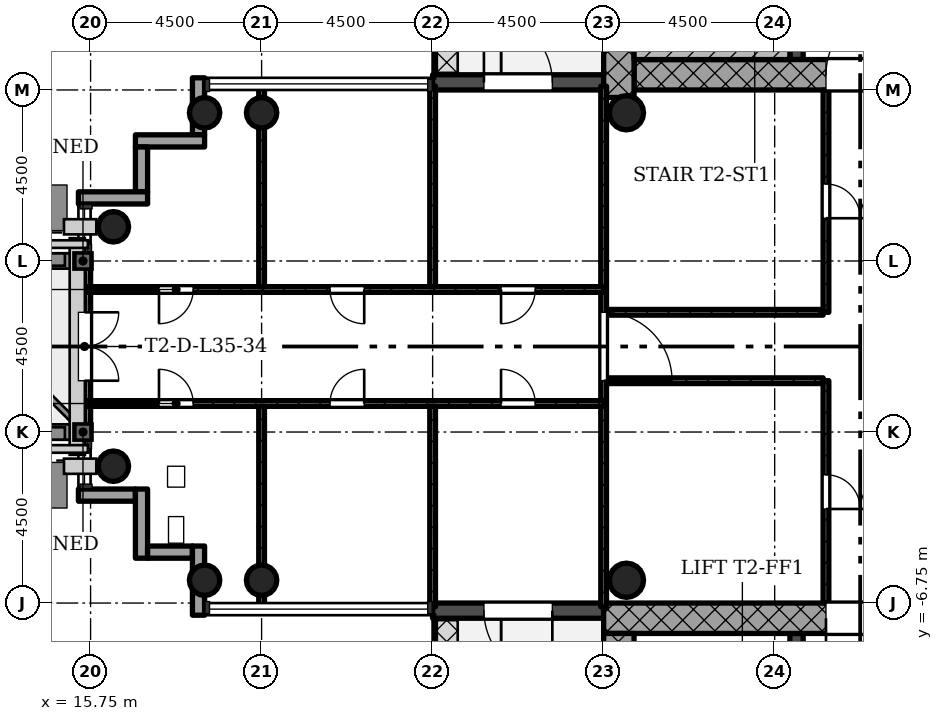
"""IFC4 building model, lengths in metres.
Left out: names, types, materials, properties, quantities, classifications, styles, units other than length and angle.
Written with IfcOpenShell. Run it as: python <this file> out.ifc"""

import sys

from ifc_helpers import new_model, si_unit, direction, frame, frame_2d, origin, origin_2d, place, context, subcontext, project, spatial, rectangle, hollow_circle, extrude, element, fill, save


model = new_model("IFC4")
c1 = context("Model", 3, precision=1e-05, world=origin(), true_north=direction((0.0, 1.0)))
c2 = subcontext(c1, "Body", "Model", "MODEL_VIEW")
j1 = project(units=[si_unit("LENGTHUNIT", "METRE"), si_unit("PLANEANGLEUNIT", "RADIAN")], contexts=[c1])
p1 = place(None, origin())
s1 = spatial("IfcSite", under=j1, at=p1, CompositionType="ELEMENT")
p2 = place(p1, origin())
s2 = spatial("IfcBuilding", under=s1, at=p2, CompositionType="ELEMENT")
p3 = place(p2, frame((0.0, 0.0, 128.7)))
s3 = spatial("IfcBuildingStorey", under=s2, at=p3, CompositionType="ELEMENT", Elevation=128.7)
p4 = place(p3, frame((30.05, 7.15, 0.0), z_axis=(0.0, 0.0, 1.0), x_axis=(1.0, 0.0, 0.0)))
e1 = element("IfcWall", 1, at=p4, inside=s3, PredefinedType="SHEAR", context=c2, shape_type="SweptSolid", body=[
    extrude(rectangle(XDim=12.7, YDim=0.8, at=frame_2d((6.35, 0.0))), origin(), (0.0, 0.0, 1.0), 5.0),
])
p5 = place(p4, frame((5.05, 0.0, 0.0)))
e2 = element("IfcOpeningElement", 2, at=p5, cuts=e1, PredefinedType="OPENING", context=c2, shape_type="SweptSolid", body=[
    extrude(rectangle(XDim=1.8, YDim=2.1, at=frame_2d((0.9, 1.05))), frame((0.0, 0.41, 0.0), z_axis=(0.0, -1.0, 0.0), x_axis=(1.0, 0.0, 0.0)), (0.0, 0.0, 1.0), 0.82),
])
p6 = place(p3, frame((29.65, 15.348, 0.0), z_axis=(0.0, 0.0, 1.0), x_axis=(0.0, -1.0, 0.0)))
e3 = element("IfcWall", 3, at=p6, inside=s3, PredefinedType="SHEAR", context=c2, shape_type="SweptSolid", body=[
    extrude(rectangle(XDim=8.796, YDim=0.8, at=frame_2d((4.398, 0.0))), origin(), (0.0, 0.0, 1.0), 5.0),
])
p7 = place(p3, frame((34.325, 7.55, 0.0), z_axis=(0.0, 0.0, 1.0), x_axis=(0.0, 1.0, 0.0)))
e4 = element("IfcWall", 4, at=p7, inside=s3, PredefinedType="SHEAR", context=c2, shape_type="SweptSolid", body=[
    extrude(rectangle(XDim=7.4, YDim=0.35, at=frame_2d((3.7, 0.0))), origin(), (0.0, 0.0, 1.0), 5.0),
])
p8 = place(p7, frame((0.85, 0.0, 0.0)))
e5 = element("IfcOpeningElement", 5, at=p8, cuts=e4, PredefinedType="OPENING", context=c2, shape_type="SweptSolid", body=[
    extrude(rectangle(XDim=0.9, YDim=2.1, at=frame_2d((0.45, 1.05))), frame((0.0, 0.185, 0.0), z_axis=(0.0, -1.0, 0.0), x_axis=(1.0, 0.0, 0.0)), (0.0, 0.0, 1.0), 0.37),
])
p9 = place(p3, frame((41.95, -7.15, 0.0), z_axis=(0.0, 0.0, 1.0), x_axis=(-1.0, 0.0, 0.0)))
e6 = element("IfcWall", 6, at=p9, inside=s3, PredefinedType="SHEAR", context=c2, shape_type="SweptSolid", body=[
    extrude(rectangle(XDim=12.7, YDim=0.8, at=frame_2d((6.35, 0.0))), origin(), (0.0, 0.0, 1.0), 5.0),
])
p10 = place(p9, frame((5.05, 0.0, 0.0)))
e7 = element("IfcOpeningElement", 7, at=p10, cuts=e6, PredefinedType="OPENING", context=c2, shape_type="SweptSolid", body=[
    extrude(rectangle(XDim=1.8, YDim=2.1, at=frame_2d((0.9, 1.05))), frame((0.0, 0.41, 0.0), z_axis=(0.0, -1.0, 0.0), x_axis=(1.0, 0.0, 0.0)), (0.0, 0.0, 1.0), 0.82),
])
p11 = place(p3, frame((29.65, -7.55, 0.0), z_axis=(0.0, 0.0, 1.0), x_axis=(0.0, -1.0, 0.0)))
e8 = element("IfcWall", 8, at=p11, inside=s3, PredefinedType="SHEAR", context=c2, shape_type="SweptSolid", body=[
    extrude(rectangle(XDim=8.2, YDim=0.8, at=frame_2d((4.1, 0.0))), origin(), (0.0, 0.0, 1.0), 5.0),
])
p12 = place(p3, frame((34.325, -14.95, 0.0), z_axis=(0.0, 0.0, 1.0), x_axis=(0.0, 1.0, 0.0)))
e9 = element("IfcWall", 9, at=p12, inside=s3, PredefinedType="SHEAR", context=c2, shape_type="SweptSolid", body=[
    extrude(rectangle(XDim=7.4, YDim=0.35, at=frame_2d((3.7, 0.0))), origin(), (0.0, 0.0, 1.0), 5.0),
])
p13 = place(p12, frame((5.35, 0.0, 0.0)))
e10 = element("IfcOpeningElement", 10, at=p13, cuts=e9, PredefinedType="OPENING", context=c2, shape_type="SweptSolid", body=[
    extrude(rectangle(XDim=1.1, YDim=2.1, at=frame_2d((0.55, 1.05))), frame((0.0, 0.185, 0.0), z_axis=(0.0, -1.0, 0.0), x_axis=(1.0, 0.0, 0.0)), (0.0, 0.0, 1.0), 0.37),
])
p14 = place(p12, frame((3.2, 0.0, 0.0)))
e11 = element("IfcOpeningElement", 11, at=p14, cuts=e9, PredefinedType="OPENING", context=c2, shape_type="SweptSolid", body=[
    extrude(rectangle(XDim=1.1, YDim=2.1, at=frame_2d((0.55, 1.05))), frame((0.0, 0.185, 0.0), z_axis=(0.0, -1.0, 0.0), x_axis=(1.0, 0.0, 0.0)), (0.0, 0.0, 1.0), 0.37),
])
p15 = place(p12, frame((1.0, 0.0, 0.0)))
e12 = element("IfcOpeningElement", 12, at=p15, cuts=e9, PredefinedType="OPENING", context=c2, shape_type="SweptSolid", body=[
    extrude(rectangle(XDim=1.1, YDim=2.1, at=frame_2d((0.55, 1.05))), frame((0.0, 0.185, 0.0), z_axis=(0.0, -1.0, 0.0), x_axis=(1.0, 0.0, 0.0)), (0.0, 0.0, 1.0), 0.37),
])
for number, where, z_axis, x_axis in (
    (13, (20.25, 6.15, 0.0), (0.0, 0.0, 1.0), (1.0, 0.0, 0.0)),
    (14, (20.25, -6.15, 0.0), (0.0, 0.0, 1.0), (1.0, 0.0, 0.0)),
    (15, (18.75, 6.15, 0.0), (0.0, 0.0, 1.0), (1.0, 0.0, 0.0)),
    (16, (18.75, -6.15, 0.0), (0.0, 0.0, 1.0), (1.0, 0.0, 0.0)),
    (17, (16.35, 3.15, 0.0), (0.0, 0.0, 1.0), (1.0, 0.0, 0.0)),
    (18, (16.35, -3.15, 0.0), (0.0, 0.0, 1.0), (1.0, 0.0, 0.0)),
):
    element("IfcColumn", number, at=place(p3, frame(where, z_axis=z_axis, x_axis=x_axis)), inside=s3, PredefinedType="COLUMN", context=c2, shape_type="SweptSolid", body=[
        extrude(hollow_circle(Radius=0.4, WallThickness=0.028, at=origin_2d()), origin(), (0.0, 0.0, 1.0), 5.0),
    ])
for number, where, z_axis, x_axis in (
    (19, (29.85, 6.15, 0.0), (0.0, 0.0, 1.0), (1.0, 0.0, 0.0)),
    (20, (29.85, -6.15, 0.0), (0.0, 0.0, 1.0), (1.0, 0.0, 0.0)),
):
    element("IfcColumn", number, at=place(p3, frame(where, z_axis=z_axis, x_axis=x_axis)), inside=s3, PredefinedType="COLUMN", context=c2, shape_type="SweptSolid", body=[
        extrude(hollow_circle(Radius=0.45, WallThickness=0.032, at=origin_2d()), origin(), (0.0, 0.0, 1.0), 5.0),
    ])
p16 = place(p3, frame((29.25, 6.95, -0.02), z_axis=(0.0, 0.0, 1.0), x_axis=(-1.0, 0.0, 0.0)))
e21 = element("IfcWall", 21, at=p16, inside=s3, PredefinedType="STANDARD", context=c2, shape_type="SweptSolid", body=[
    extrude(rectangle(XDim=4.5, YDim=0.4, at=frame_2d((2.25, 0.0))), origin(), (0.0, 0.0, 1.0), 4.72),
])
p17 = place(p16, frame((1.35, 0.0, 0.02)))
e22 = element("IfcOpeningElement", 22, at=p17, cuts=e21, PredefinedType="OPENING", context=c2, shape_type="SweptSolid", body=[
    extrude(rectangle(XDim=1.8, YDim=2.1, at=frame_2d((0.9, 1.05))), frame((0.0, 0.21, 0.0), z_axis=(0.0, -1.0, 0.0), x_axis=(1.0, 0.0, 0.0)), (0.0, 0.0, 1.0), 0.42),
])
p18 = place(p3, frame((18.59, 7.07, -0.3), z_axis=(0.0, 0.0, 1.0), x_axis=(0.0, -1.0, 0.0)))
e23 = element("IfcWall", 23, at=p18, inside=s3, PredefinedType="STANDARD", context=c2, shape_type="SweptSolid", body=[
    extrude(rectangle(XDim=1.5, YDim=0.32, at=frame_2d((0.75, 0.0))), origin(), (0.0, 0.0, 1.0), 5.0),
])
p19 = place(p3, frame((18.75, 5.41, -0.3), z_axis=(0.0, 0.0, 1.0), x_axis=(-1.0, 0.0, 0.0)))
e24 = element("IfcWall", 24, at=p19, inside=s3, PredefinedType="STANDARD", context=c2, shape_type="SweptSolid", body=[
    extrude(rectangle(XDim=1.82, YDim=0.32, at=frame_2d((0.91, 0.0))), origin(), (0.0, 0.0, 1.0), 5.0),
])
p20 = place(p3, frame((17.09, 5.25, -0.3), z_axis=(0.0, 0.0, 1.0), x_axis=(0.0, -1.0, 0.0)))
e25 = element("IfcWall", 25, at=p20, inside=s3, PredefinedType="STANDARD", context=c2, shape_type="SweptSolid", body=[
    extrude(rectangle(XDim=1.18, YDim=0.32, at=frame_2d((0.59, 0.0))), origin(), (0.0, 0.0, 1.0), 5.0),
])
p21 = place(p3, frame((17.25, 3.91, -0.3), z_axis=(0.0, 0.0, 1.0), x_axis=(-1.0, 0.0, 0.0)))
e26 = element("IfcWall", 26, at=p21, inside=s3, PredefinedType="STANDARD", context=c2, shape_type="SweptSolid", body=[
    extrude(rectangle(XDim=1.82, YDim=0.32, at=frame_2d((0.91, 0.0))), origin(), (0.0, 0.0, 1.0), 5.0),
])
p22 = place(p3, frame((15.59, 2.25, -0.12), z_axis=(0.0, 0.0, 1.0), x_axis=(0.0, -1.0, 0.0)))
e27 = element("IfcWall", 27, at=p22, inside=s3, PredefinedType="STANDARD", context=c2, shape_type="SweptSolid", body=[
    extrude(rectangle(XDim=4.5, YDim=0.32, at=frame_2d((2.25, 0.0))), origin(), (0.0, 0.0, 1.0), 4.82),
])
p23 = place(p22, frame((1.35, 0.0, 0.0)))
e28 = element("IfcOpeningElement", 28, at=p23, cuts=e27, PredefinedType="OPENING", context=c2, shape_type="SweptSolid", body=[
    extrude(rectangle(XDim=1.8, YDim=2.1, at=frame_2d((0.9, 1.05))), frame((0.0, 0.17, 0.0), z_axis=(0.0, -1.0, 0.0), x_axis=(1.0, 0.0, 0.0)), (0.0, 0.0, 1.0), 0.34),
])
p24 = place(p3, frame((15.43, -3.91, -0.3), z_axis=(0.0, 0.0, 1.0), x_axis=(1.0, 0.0, 0.0)))
e29 = element("IfcWall", 29, at=p24, inside=s3, PredefinedType="STANDARD", context=c2, shape_type="SweptSolid", body=[
    extrude(rectangle(XDim=1.5, YDim=0.32, at=frame_2d((0.75, 0.0))), origin(), (0.0, 0.0, 1.0), 5.0),
])
p25 = place(p3, frame((17.09, -3.75, -0.3), z_axis=(0.0, 0.0, 1.0), x_axis=(0.0, -1.0, 0.0)))
e30 = element("IfcWall", 30, at=p25, inside=s3, PredefinedType="STANDARD", context=c2, shape_type="SweptSolid", body=[
    extrude(rectangle(XDim=1.82, YDim=0.32, at=frame_2d((0.91, 0.0))), origin(), (0.0, 0.0, 1.0), 5.0),
])
p26 = place(p3, frame((17.25, -5.41, -0.3), z_axis=(0.0, 0.0, 1.0), x_axis=(1.0, 0.0, 0.0)))
e31 = element("IfcWall", 31, at=p26, inside=s3, PredefinedType="STANDARD", context=c2, shape_type="SweptSolid", body=[
    extrude(rectangle(XDim=1.18, YDim=0.32, at=frame_2d((0.59, 0.0))), origin(), (0.0, 0.0, 1.0), 5.0),
])
p27 = place(p3, frame((18.59, -5.25, -0.3), z_axis=(0.0, 0.0, 1.0), x_axis=(0.0, -1.0, 0.0)))
e32 = element("IfcWall", 32, at=p27, inside=s3, PredefinedType="STANDARD", context=c2, shape_type="SweptSolid", body=[
    extrude(rectangle(XDim=1.82, YDim=0.32, at=frame_2d((0.91, 0.0))), origin(), (0.0, 0.0, 1.0), 5.0),
])
p28 = place(p3, frame((24.75, -6.95, -0.02), z_axis=(0.0, 0.0, 1.0), x_axis=(1.0, 0.0, 0.0)))
e33 = element("IfcWall", 33, at=p28, inside=s3, PredefinedType="STANDARD", context=c2, shape_type="SweptSolid", body=[
    extrude(rectangle(XDim=4.5, YDim=0.4, at=frame_2d((2.25, 0.0))), origin(), (0.0, 0.0, 1.0), 4.72),
])
p29 = place(p28, frame((1.35, 0.0, 0.02)))
e34 = element("IfcOpeningElement", 34, at=p29, cuts=e33, PredefinedType="OPENING", context=c2, shape_type="SweptSolid", body=[
    extrude(rectangle(XDim=1.8, YDim=2.1, at=frame_2d((0.9, 1.05))), frame((0.0, 0.21, 0.0), z_axis=(0.0, -1.0, 0.0), x_axis=(1.0, 0.0, 0.0)), (0.0, 0.0, 1.0), 0.42),
])
p30 = place(p3, frame((35.1, 0.9, 0.0), z_axis=(0.0, 0.0, 1.0), x_axis=(0.0, 1.0, 0.0)))
e35 = element("IfcWall", 35, at=p30, inside=s3, PredefinedType="PARTITIONING", context=c2, shape_type="SweptSolid", body=[
    extrude(rectangle(XDim=5.85, YDim=0.15, at=frame_2d((2.925, 0.0))), origin(), (0.0, 0.0, 1.0), 4.58),
])
p31 = place(p30, frame((2.475, 0.0, 0.0)))
e36 = element("IfcOpeningElement", 36, at=p31, cuts=e35, PredefinedType="OPENING", context=c2, shape_type="SweptSolid", body=[
    extrude(rectangle(XDim=0.9, YDim=2.1, at=frame_2d((0.45, 1.05))), frame((0.0, 0.085, 0.0), z_axis=(0.0, -1.0, 0.0), x_axis=(1.0, 0.0, 0.0)), (0.0, 0.0, 1.0), 0.17),
])
p32 = place(p3, frame((35.025, 0.9, 0.0), z_axis=(0.0, 0.0, 1.0), x_axis=(-1.0, 0.0, 0.0)))
e37 = element("IfcWall", 37, at=p32, inside=s3, PredefinedType="PARTITIONING", context=c2, shape_type="SweptSolid", body=[
    extrude(rectangle(XDim=5.7, YDim=0.15, at=frame_2d((2.85, 0.0))), origin(), (0.0, 0.0, 1.0), 4.58),
])
p33 = place(p3, frame((35.1, -6.75, 0.0), z_axis=(0.0, 0.0, 1.0), x_axis=(0.0, 1.0, 0.0)))
e38 = element("IfcWall", 38, at=p33, inside=s3, PredefinedType="PARTITIONING", context=c2, shape_type="SweptSolid", body=[
    extrude(rectangle(XDim=5.85, YDim=0.15, at=frame_2d((2.925, 0.0))), origin(), (0.0, 0.0, 1.0), 4.58),
])
p34 = place(p33, frame((2.475, 0.0, 0.0)))
e39 = element("IfcOpeningElement", 39, at=p34, cuts=e38, PredefinedType="OPENING", context=c2, shape_type="SweptSolid", body=[
    extrude(rectangle(XDim=0.9, YDim=2.1, at=frame_2d((0.45, 1.05))), frame((0.0, 0.085, 0.0), z_axis=(0.0, -1.0, 0.0), x_axis=(1.0, 0.0, 0.0)), (0.0, 0.0, 1.0), 0.17),
])
p35 = place(p3, frame((35.025, -0.9, 0.0), z_axis=(0.0, 0.0, 1.0), x_axis=(-1.0, 0.0, 0.0)))
e40 = element("IfcWall", 40, at=p35, inside=s3, PredefinedType="PARTITIONING", context=c2, shape_type="SweptSolid", body=[
    extrude(rectangle(XDim=5.7, YDim=0.15, at=frame_2d((2.85, 0.0))), origin(), (0.0, 0.0, 1.0), 4.58),
])
p36 = place(p3, frame((29.25, -6.85, 0.0), z_axis=(0.0, 0.0, 1.0), x_axis=(0.0, 1.0, 0.0)))
e41 = element("IfcWall", 41, at=p36, inside=s3, PredefinedType="PARTITIONING", context=c2, shape_type="SweptSolid", body=[
    extrude(rectangle(XDim=13.7, YDim=0.15, at=frame_2d((6.85, 0.0))), origin(), (0.0, 0.0, 1.0), 4.58),
])
p37 = place(p36, frame((5.95, 0.0, 0.0)))
e42 = element("IfcOpeningElement", 42, at=p37, cuts=e41, PredefinedType="OPENING", context=c2, shape_type="SweptSolid", body=[
    extrude(rectangle(XDim=1.8, YDim=2.1, at=frame_2d((0.9, 1.05))), frame((0.0, 0.085, 0.0), z_axis=(0.0, -1.0, 0.0), x_axis=(1.0, 0.0, 0.0)), (0.0, 0.0, 1.0), 0.17),
])
p38 = place(p3, frame((29.25, 1.5, 0.0), z_axis=(0.0, 0.0, 1.0), x_axis=(-1.0, 0.0, 0.0)))
e43 = element("IfcWall", 43, at=p38, inside=s3, PredefinedType="PARTITIONING", context=c2, shape_type="SweptSolid", body=[
    extrude(rectangle(XDim=13.6, YDim=0.15, at=frame_2d((6.8, 0.0))), origin(), (0.0, 0.0, 1.0), 4.58),
])
p39 = place(p38, frame((1.8, 0.0, 0.0)))
e44 = element("IfcOpeningElement", 44, at=p39, cuts=e43, PredefinedType="OPENING", context=c2, shape_type="SweptSolid", body=[
    extrude(rectangle(XDim=0.9, YDim=2.1, at=frame_2d((0.45, 1.05))), frame((0.0, 0.085, 0.0), z_axis=(0.0, -1.0, 0.0), x_axis=(1.0, 0.0, 0.0)), (0.0, 0.0, 1.0), 0.17),
])
p40 = place(p38, frame((6.3, 0.0, 0.0)))
e45 = element("IfcOpeningElement", 45, at=p40, cuts=e43, PredefinedType="OPENING", context=c2, shape_type="SweptSolid", body=[
    extrude(rectangle(XDim=0.9, YDim=2.1, at=frame_2d((0.45, 1.05))), frame((0.0, 0.085, 0.0), z_axis=(0.0, -1.0, 0.0), x_axis=(1.0, 0.0, 0.0)), (0.0, 0.0, 1.0), 0.17),
])
p41 = place(p38, frame((10.8, 0.0, 0.0)))
e46 = element("IfcOpeningElement", 46, at=p41, cuts=e43, PredefinedType="OPENING", context=c2, shape_type="SweptSolid", body=[
    extrude(rectangle(XDim=0.9, YDim=2.1, at=frame_2d((0.45, 1.05))), frame((0.0, 0.085, 0.0), z_axis=(0.0, -1.0, 0.0), x_axis=(1.0, 0.0, 0.0)), (0.0, 0.0, 1.0), 0.17),
])
for number, where, z_axis, x_axis in (
    (47, (24.75, 1.575, 0.0), (0.0, 0.0, 1.0), (0.0, 1.0, 0.0)),
    (48, (20.25, 1.575, 0.0), (0.0, 0.0, 1.0), (0.0, 1.0, 0.0)),
):
    element("IfcWall", number, at=place(p3, frame(where, z_axis=z_axis, x_axis=x_axis)), inside=s3, PredefinedType="PARTITIONING", context=c2, shape_type="SweptSolid", body=[
        extrude(rectangle(XDim=5.275, YDim=0.15, at=frame_2d((2.638, 0.0))), origin(), (0.0, 0.0, 1.0), 4.58),
    ])
p42 = place(p3, frame((29.25, -1.5, 0.0), z_axis=(0.0, 0.0, 1.0), x_axis=(-1.0, 0.0, 0.0)))
e49 = element("IfcWall", 49, at=p42, inside=s3, PredefinedType="PARTITIONING", context=c2, shape_type="SweptSolid", body=[
    extrude(rectangle(XDim=13.6, YDim=0.15, at=frame_2d((6.8, 0.0))), origin(), (0.0, 0.0, 1.0), 4.58),
])
p43 = place(p42, frame((1.8, 0.0, 0.0)))
e50 = element("IfcOpeningElement", 50, at=p43, cuts=e49, PredefinedType="OPENING", context=c2, shape_type="SweptSolid", body=[
    extrude(rectangle(XDim=0.9, YDim=2.1, at=frame_2d((0.45, 1.05))), frame((0.0, 0.085, 0.0), z_axis=(0.0, -1.0, 0.0), x_axis=(1.0, 0.0, 0.0)), (0.0, 0.0, 1.0), 0.17),
])
p44 = place(p42, frame((6.3, 0.0, 0.0)))
e51 = element("IfcOpeningElement", 51, at=p44, cuts=e49, PredefinedType="OPENING", context=c2, shape_type="SweptSolid", body=[
    extrude(rectangle(XDim=0.9, YDim=2.1, at=frame_2d((0.45, 1.05))), frame((0.0, 0.085, 0.0), z_axis=(0.0, -1.0, 0.0), x_axis=(1.0, 0.0, 0.0)), (0.0, 0.0, 1.0), 0.17),
])
p45 = place(p42, frame((10.8, 0.0, 0.0)))
e52 = element("IfcOpeningElement", 52, at=p45, cuts=e49, PredefinedType="OPENING", context=c2, shape_type="SweptSolid", body=[
    extrude(rectangle(XDim=0.9, YDim=2.1, at=frame_2d((0.45, 1.05))), frame((0.0, 0.085, 0.0), z_axis=(0.0, -1.0, 0.0), x_axis=(1.0, 0.0, 0.0)), (0.0, 0.0, 1.0), 0.17),
])
for number, where, z_axis, x_axis in (
    (53, (24.75, -1.575, 0.0), (0.0, 0.0, 1.0), (0.0, -1.0, 0.0)),
    (54, (20.25, -1.575, 0.0), (0.0, 0.0, 1.0), (0.0, -1.0, 0.0)),
):
    element("IfcWall", number, at=place(p3, frame(where, z_axis=z_axis, x_axis=x_axis)), inside=s3, PredefinedType="PARTITIONING", context=c2, shape_type="SweptSolid", body=[
        extrude(rectangle(XDim=5.275, YDim=0.15, at=frame_2d((2.638, 0.0))), origin(), (0.0, 0.0, 1.0), 4.58),
    ])
p46 = place(p3, frame((34.15, 7.75, 0.0), z_axis=(0.0, 0.0, 1.0), x_axis=(-1.0, 0.0, 0.0)))
e55 = element("IfcWall", 55, at=p46, inside=s3, PredefinedType="SHEAR", context=c2, shape_type="SweptSolid", body=[
    extrude(rectangle(XDim=4.1, YDim=0.4, at=frame_2d((2.05, 0.0))), origin(), (0.0, 0.0, 1.0), 5.0),
])
p47 = place(p17, origin())
e56 = element("IfcDoor", 56, at=p47, inside=s3, OperationType="SINGLE_SWING_RIGHT", PredefinedType="DOOR", context=c2, shape_type="SweptSolid", body=[
    extrude(rectangle(XDim=1.8, YDim=2.1, at=frame_2d((0.9, 1.05))), frame((0.0, 0.025, 0.0), z_axis=(0.0, -1.0, 0.0), x_axis=(1.0, 0.0, 0.0)), (0.0, 0.0, 1.0), 0.05),
])
fill(e22, e56)
p48 = place(p23, origin())
e57 = element("IfcDoor", 57, at=p48, inside=s3, OperationType="DOUBLE_DOOR_SINGLE_SWING", PredefinedType="DOOR", context=c2, shape_type="SweptSolid", body=[
    extrude(rectangle(XDim=1.8, YDim=2.1, at=frame_2d((0.9, 1.05))), frame((0.0, 0.025, 0.0), z_axis=(0.0, -1.0, 0.0), x_axis=(1.0, 0.0, 0.0)), (0.0, 0.0, 1.0), 0.05),
])
fill(e28, e57)
p49 = place(p29, origin())
e58 = element("IfcDoor", 58, at=p49, inside=s3, OperationType="SINGLE_SWING_RIGHT", PredefinedType="DOOR", context=c2, shape_type="SweptSolid", body=[
    extrude(rectangle(XDim=1.8, YDim=2.1, at=frame_2d((0.9, 1.05))), frame((0.0, 0.025, 0.0), z_axis=(0.0, -1.0, 0.0), x_axis=(1.0, 0.0, 0.0)), (0.0, 0.0, 1.0), 0.05),
])
fill(e34, e58)
p50 = place(p31, origin())
e59 = element("IfcDoor", 59, at=p50, inside=s3, OperationType="SINGLE_SWING_LEFT", PredefinedType="DOOR", context=c2, shape_type="SweptSolid", body=[
    extrude(rectangle(XDim=0.9, YDim=2.1, at=frame_2d((0.45, 1.05))), frame((0.0, 0.025, 0.0), z_axis=(0.0, -1.0, 0.0), x_axis=(1.0, 0.0, 0.0)), (0.0, 0.0, 1.0), 0.05),
])
fill(e36, e59)
p51 = place(p34, origin())
e60 = element("IfcDoor", 60, at=p51, inside=s3, OperationType="SINGLE_SWING_LEFT", PredefinedType="DOOR", context=c2, shape_type="SweptSolid", body=[
    extrude(rectangle(XDim=0.9, YDim=2.1, at=frame_2d((0.45, 1.05))), frame((0.0, 0.025, 0.0), z_axis=(0.0, -1.0, 0.0), x_axis=(1.0, 0.0, 0.0)), (0.0, 0.0, 1.0), 0.05),
])
fill(e39, e60)
p52 = place(p37, origin())
e61 = element("IfcDoor", 61, at=p52, inside=s3, OperationType="SINGLE_SWING_LEFT", PredefinedType="DOOR", context=c2, shape_type="SweptSolid", body=[
    extrude(rectangle(XDim=1.8, YDim=2.1, at=frame_2d((0.9, 1.05))), frame((0.0, 0.025, 0.0), z_axis=(0.0, -1.0, 0.0), x_axis=(1.0, 0.0, 0.0)), (0.0, 0.0, 1.0), 0.05),
])
fill(e42, e61)
p53 = place(p39, origin())
e62 = element("IfcDoor", 62, at=p53, inside=s3, OperationType="SINGLE_SWING_LEFT", PredefinedType="DOOR", context=c2, shape_type="SweptSolid", body=[
    extrude(rectangle(XDim=0.9, YDim=2.1, at=frame_2d((0.45, 1.05))), frame((0.0, 0.025, 0.0), z_axis=(0.0, -1.0, 0.0), x_axis=(1.0, 0.0, 0.0)), (0.0, 0.0, 1.0), 0.05),
])
fill(e44, e62)
p54 = place(p40, origin())
e63 = element("IfcDoor", 63, at=p54, inside=s3, OperationType="SINGLE_SWING_RIGHT", PredefinedType="DOOR", context=c2, shape_type="SweptSolid", body=[
    extrude(rectangle(XDim=0.9, YDim=2.1, at=frame_2d((0.45, 1.05))), frame((0.0, 0.025, 0.0), z_axis=(0.0, -1.0, 0.0), x_axis=(1.0, 0.0, 0.0)), (0.0, 0.0, 1.0), 0.05),
])
fill(e45, e63)
p55 = place(p41, origin())
e64 = element("IfcDoor", 64, at=p55, inside=s3, OperationType="SINGLE_SWING_LEFT", PredefinedType="DOOR", context=c2, shape_type="SweptSolid", body=[
    extrude(rectangle(XDim=0.9, YDim=2.1, at=frame_2d((0.45, 1.05))), frame((0.0, 0.025, 0.0), z_axis=(0.0, -1.0, 0.0), x_axis=(1.0, 0.0, 0.0)), (0.0, 0.0, 1.0), 0.05),
])
fill(e46, e64)
p56 = place(p43, origin())
e65 = element("IfcDoor", 65, at=p56, inside=s3, OperationType="SINGLE_SWING_RIGHT", PredefinedType="DOOR", context=c2, shape_type="SweptSolid", body=[
    extrude(rectangle(XDim=0.9, YDim=2.1, at=frame_2d((0.45, 1.05))), frame((0.0, 0.025, 0.0), z_axis=(0.0, -1.0, 0.0), x_axis=(1.0, 0.0, 0.0)), (0.0, 0.0, 1.0), 0.05),
])
fill(e50, e65)
p57 = place(p44, origin())
e66 = element("IfcDoor", 66, at=p57, inside=s3, OperationType="SINGLE_SWING_LEFT", PredefinedType="DOOR", context=c2, shape_type="SweptSolid", body=[
    extrude(rectangle(XDim=0.9, YDim=2.1, at=frame_2d((0.45, 1.05))), frame((0.0, 0.025, 0.0), z_axis=(0.0, -1.0, 0.0), x_axis=(1.0, 0.0, 0.0)), (0.0, 0.0, 1.0), 0.05),
])
fill(e51, e66)
p58 = place(p45, origin())
e67 = element("IfcDoor", 67, at=p58, inside=s3, OperationType="SINGLE_SWING_RIGHT", PredefinedType="DOOR", context=c2, shape_type="SweptSolid", body=[
    extrude(rectangle(XDim=0.9, YDim=2.1, at=frame_2d((0.45, 1.05))), frame((0.0, 0.025, 0.0), z_axis=(0.0, -1.0, 0.0), x_axis=(1.0, 0.0, 0.0)), (0.0, 0.0, 1.0), 0.05),
])
fill(e52, e67)
p59 = place(p5, origin())
e68 = element("IfcDoor", 68, at=p59, inside=s3, OperationType="SINGLE_SWING_LEFT", PredefinedType="DOOR", context=c2, shape_type="SweptSolid", body=[
    extrude(rectangle(XDim=1.8, YDim=2.1, at=frame_2d((0.9, 1.05))), frame((0.0, 0.025, 0.0), z_axis=(0.0, -1.0, 0.0), x_axis=(1.0, 0.0, 0.0)), (0.0, 0.0, 1.0), 0.05),
])
fill(e2, e68)
p60 = place(p10, origin())
e69 = element("IfcDoor", 69, at=p60, inside=s3, OperationType="SINGLE_SWING_LEFT", PredefinedType="DOOR", context=c2, shape_type="SweptSolid", body=[
    extrude(rectangle(XDim=1.8, YDim=2.1, at=frame_2d((0.9, 1.05))), frame((0.0, 0.025, 0.0), z_axis=(0.0, -1.0, 0.0), x_axis=(1.0, 0.0, 0.0)), (0.0, 0.0, 1.0), 0.05),
])
fill(e7, e69)
save(model, sys.argv[1])
